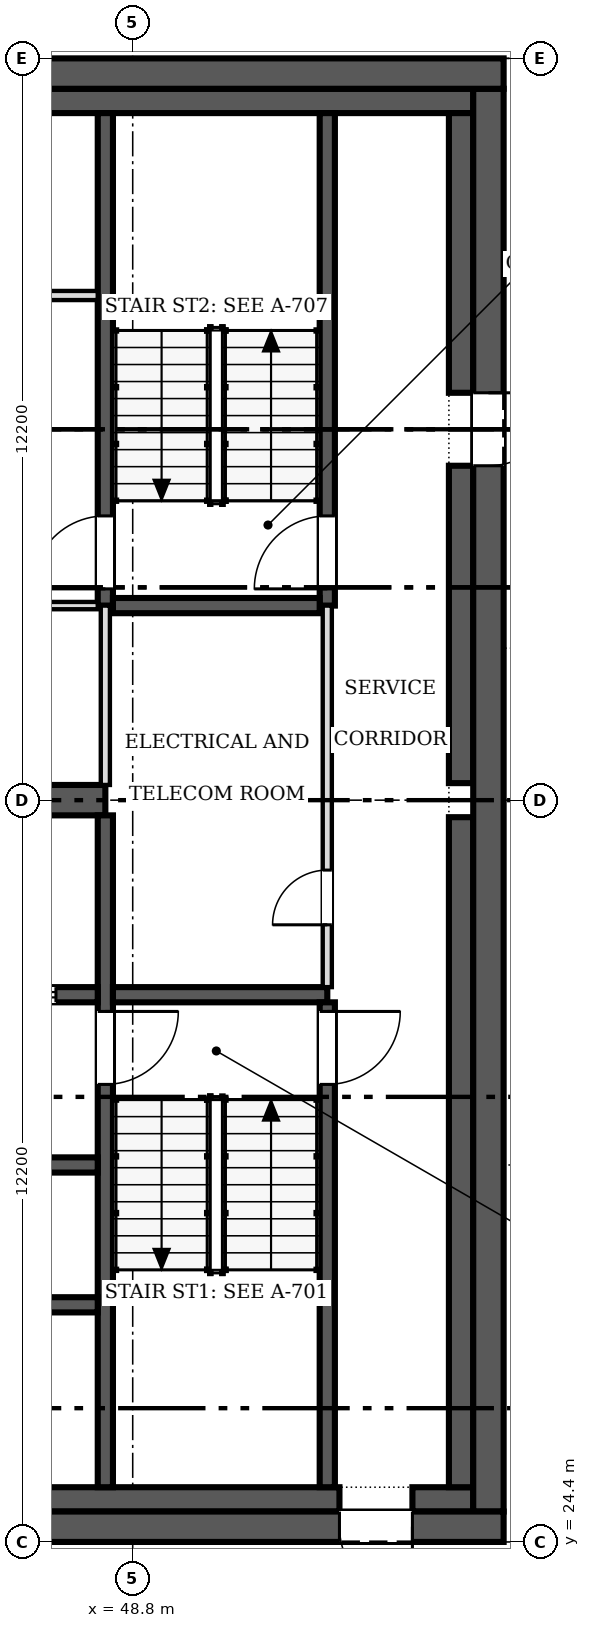
"""IFC4 building model, lengths in metres.
Left out: names, types, materials, properties, quantities, classifications, styles, units other than length and angle.
Written with IfcOpenShell. Run it as: python <this file> out.ifc"""

import sys

from ifc_helpers import new_model, si_unit, direction, frame, frame_2d, origin, place, context, subcontext, project, spatial, rectangle, extrude, source, transform, mapped, element, fill, save


model = new_model("IFC4")
c1 = context("Model", 3, precision=1e-05, world=origin(), true_north=direction((0.0, 1.0)))
c2 = subcontext(c1, "Body", "Model", "MODEL_VIEW")
j1 = project(units=[si_unit("LENGTHUNIT", "METRE"), si_unit("PLANEANGLEUNIT", "RADIAN")], contexts=[c1])
p1 = place(None, origin())
s1 = spatial("IfcSite", under=j1, at=p1, CompositionType="ELEMENT")
p2 = place(p1, origin())
s2 = spatial("IfcBuilding", under=s1, at=p2, CompositionType="ELEMENT")
p3 = place(p2, frame((0.0, 0.0, 197.9)))
s3 = spatial("IfcBuildingStorey", under=s2, at=p3, CompositionType="ELEMENT", Elevation=197.9)
p4 = place(p3, frame((54.9, 24.65, 0.0), z_axis=(0.0, 0.0, 1.0), x_axis=(-1.0, 0.0, 0.0)))
e1 = element("IfcWall", 1, at=p4, inside=s3, PredefinedType="SHEAR", context=c2, shape_type="SweptSolid", body=[
    extrude(rectangle(XDim=24.4, YDim=0.5, at=frame_2d((12.2, 0.0))), origin(), (0.0, 0.0, 1.0), 3.8),
])
m1 = source(origin(), c2, "Body", "SweptSolid", [
    extrude(rectangle(XDim=1.2, YDim=2.1, at=frame_2d((0.6, 1.05))), frame((0.0, 0.26, 0.0), z_axis=(0.0, -1.0, 0.0), x_axis=(1.0, 0.0, 0.0)), (0.0, 0.0, 1.0), 0.52),
])
p5 = place(p4, frame((1.5, 0.0, 0.0)))
e2 = element("IfcOpeningElement", 2, at=p5, cuts=e1, PredefinedType="OPENING", context=c2, shape_type="MappedRepresentation", body=[
    mapped(m1, transform((0.0, 0.0, 0.0), scale=1.0)),
])
p6 = place(p3, frame((30.5, 48.55, 0.0), z_axis=(0.0, 0.0, 1.0), x_axis=(1.0, 0.0, 0.0)))
e3 = element("IfcWall", 3, at=p6, inside=s3, PredefinedType="SHEAR", context=c2, shape_type="SweptSolid", body=[
    extrude(rectangle(XDim=24.4, YDim=0.5, at=frame_2d((12.2, 0.0))), origin(), (0.0, 0.0, 1.0), 3.8),
])
p7 = place(p3, frame((54.65, 48.3, 0.0), z_axis=(0.0, 0.0, 1.0), x_axis=(0.0, -1.0, 0.0)))
e4 = element("IfcWall", 4, at=p7, inside=s3, PredefinedType="SHEAR", context=c2, shape_type="SweptSolid", body=[
    extrude(rectangle(XDim=23.4, YDim=0.5, at=frame_2d((11.7, 0.0))), origin(), (0.0, 0.0, 1.0), 3.8),
])
p8 = place(p7, frame((5.0, 0.0, 0.0)))
e5 = element("IfcOpeningElement", 5, at=p8, cuts=e4, PredefinedType="OPENING", context=c2, shape_type="MappedRepresentation", body=[
    mapped(m1, transform((0.0, 0.0, 0.0), scale=1.0)),
])
p9 = place(p3, frame((31.0, 25.1, 0.0), z_axis=(0.0, 0.0, 1.0), x_axis=(1.0, 0.0, 0.0)))
e6 = element("IfcWall", 6, at=p9, inside=s3, PredefinedType="SOLIDWALL", context=c2, shape_type="SweptSolid", body=[
    extrude(rectangle(XDim=21.2, YDim=0.4, at=frame_2d((10.6, 0.0))), origin(), (0.0, 0.0, 1.0), 3.8),
])
p10 = place(p3, frame((53.4, 25.1, 0.0), z_axis=(0.0, 0.0, 1.0), x_axis=(1.0, 0.0, 0.0)))
e7 = element("IfcWall", 7, at=p10, inside=s3, PredefinedType="SOLIDWALL", context=c2, shape_type="SweptSolid", body=[
    extrude(rectangle(XDim=1.0, YDim=0.4, at=frame_2d((0.5, 0.0))), origin(), (0.0, 0.0, 1.0), 3.8),
])
p11 = place(p3, frame((31.0, 48.1, 0.0), z_axis=(0.0, 0.0, 1.0), x_axis=(1.0, 0.0, 0.0)))
e8 = element("IfcWall", 8, at=p11, inside=s3, PredefinedType="SOLIDWALL", context=c2, shape_type="SweptSolid", body=[
    extrude(rectangle(XDim=23.4, YDim=0.4, at=frame_2d((11.7, 0.0))), origin(), (0.0, 0.0, 1.0), 3.8),
])
p12 = place(p3, frame((54.2, 25.3, 0.0), z_axis=(0.0, 0.0, 1.0), x_axis=(0.0, 1.0, 0.0)))
e9 = element("IfcWall", 9, at=p12, inside=s3, PredefinedType="SOLIDWALL", context=c2, shape_type="SweptSolid", body=[
    extrude(rectangle(XDim=11.02, YDim=0.4, at=frame_2d((5.51, 0.0))), origin(), (0.0, 0.0, 1.0), 3.8),
])
p13 = place(p3, frame((54.2, 36.88, 0.0), z_axis=(0.0, 0.0, 1.0), x_axis=(0.0, 1.0, 0.0)))
e10 = element("IfcWall", 10, at=p13, inside=s3, PredefinedType="SOLIDWALL", context=c2, shape_type="SweptSolid", body=[
    extrude(rectangle(XDim=5.22, YDim=0.4, at=frame_2d((2.61, 0.0))), origin(), (0.0, 0.0, 1.0), 3.8),
])
p14 = place(p3, frame((54.2, 43.3, 0.0), z_axis=(0.0, 0.0, 1.0), x_axis=(0.0, 1.0, 0.0)))
e11 = element("IfcWall", 11, at=p14, inside=s3, PredefinedType="SOLIDWALL", context=c2, shape_type="SweptSolid", body=[
    extrude(rectangle(XDim=4.6, YDim=0.4, at=frame_2d((2.3, 0.0))), origin(), (0.0, 0.0, 1.0), 3.8),
])
p15 = place(p3, frame((31.4, 36.6, 0.0), z_axis=(0.0, 0.0, 1.0), x_axis=(1.0, 0.0, 0.0)))
e12 = element("IfcWall", 12, at=p15, inside=s3, PredefinedType="SHEAR", context=c2, shape_type="SweptSolid", body=[
    extrude(rectangle(XDim=16.95, YDim=0.5, at=frame_2d((8.475, 0.0))), origin(), (0.0, 0.0, 1.0), 3.8),
])
p16 = place(p3, frame((48.35, 36.35, 0.0), z_axis=(0.0, 0.0, 1.0), x_axis=(0.0, -1.0, 0.0)))
e13 = element("IfcWall", 13, at=p16, inside=s3, PredefinedType="SOLIDWALL", context=c2, shape_type="SweptSolid", body=[
    extrude(rectangle(XDim=11.05, YDim=0.25, at=frame_2d((5.525, 0.0))), origin(), (0.0, 0.0, 1.0), 3.8),
])
m2 = source(origin(), c2, "Body", "SweptSolid", [
    extrude(rectangle(XDim=1.2, YDim=2.1, at=frame_2d((0.6, 1.05))), frame((0.0, 0.135, 0.0), z_axis=(0.0, -1.0, 0.0), x_axis=(1.0, 0.0, 0.0)), (0.0, 0.0, 1.0), 0.27),
])
p17 = place(p16, frame((3.225, 0.0, 0.0)))
e14 = element("IfcOpeningElement", 14, at=p17, cuts=e13, PredefinedType="OPENING", context=c2, shape_type="MappedRepresentation", body=[
    mapped(m2, transform((0.0, 0.0, 0.0), scale=1.0)),
])
p18 = place(p3, frame((48.225, 33.4, 0.0), z_axis=(0.0, 0.0, 1.0), x_axis=(-1.0, 0.0, 0.0)))
e15 = element("IfcWall", 15, at=p18, inside=s3, PredefinedType="SOLIDWALL", context=c2, shape_type="SweptSolid", body=[
    extrude(rectangle(XDim=5.275, YDim=0.25, at=frame_2d((2.638, 0.0))), origin(), (0.0, 0.0, 1.0), 3.8),
])
p19 = place(p18, frame((3.512, 0.0, 0.0)))
e16 = element("IfcOpeningElement", 16, at=p19, cuts=e15, PredefinedType="OPENING", context=c2, shape_type="MappedRepresentation", body=[
    mapped(m2, transform((0.0, 0.0, 0.0), scale=1.0)),
])
p20 = place(p18, frame((0.688, 0.0, 0.0)))
e17 = element("IfcOpeningElement", 17, at=p20, cuts=e15, PredefinedType="OPENING", context=c2, shape_type="MappedRepresentation", body=[
    mapped(m2, transform((0.0, 0.0, 0.0), scale=1.0)),
])
p21 = place(p3, frame((48.475, 33.4, 0.0), z_axis=(0.0, 0.0, 1.0), x_axis=(1.0, 0.0, 0.0)))
e18 = element("IfcWall", 18, at=p21, inside=s3, PredefinedType="SOLIDWALL", context=c2, shape_type="SweptSolid", body=[
    extrude(rectangle(XDim=3.525, YDim=0.25, at=frame_2d((1.762, 0.0))), origin(), (0.0, 0.0, 1.0), 3.8),
])
p22 = place(p3, frame((48.35, 47.9, 0.0), z_axis=(0.0, 0.0, 1.0), x_axis=(0.0, -1.0, 0.0)))
e19 = element("IfcWall", 19, at=p22, inside=s3, PredefinedType="SOLIDWALL", context=c2, shape_type="SweptSolid", body=[
    extrude(rectangle(XDim=8.1, YDim=0.25, at=frame_2d((4.05, 0.0))), origin(), (0.0, 0.0, 1.0), 3.8),
])
p23 = place(p22, frame((6.625, 0.0, 0.0)))
e20 = element("IfcOpeningElement", 20, at=p23, cuts=e19, PredefinedType="OPENING", context=c2, shape_type="MappedRepresentation", body=[
    mapped(m2, transform((0.0, 0.0, 0.0), scale=1.0)),
])
p24 = place(p3, frame((52.0, 25.3, 0.0), z_axis=(0.0, 0.0, 1.0), x_axis=(0.0, 1.0, 0.0)))
e21 = element("IfcWall", 21, at=p24, inside=s3, PredefinedType="SOLIDWALL", context=c2, shape_type="SweptSolid", body=[
    extrude(rectangle(XDim=7.975, YDim=0.25, at=frame_2d((3.987, 0.0))), origin(), (0.0, 0.0, 1.0), 3.8),
])
p25 = place(p24, frame((6.625, 0.0, 0.0)))
e22 = element("IfcOpeningElement", 22, at=p25, cuts=e21, PredefinedType="OPENING", context=c2, shape_type="MappedRepresentation", body=[
    mapped(m2, transform((0.0, 0.0, 0.0), scale=1.0)),
])
p26 = place(p3, frame((52.0, 39.8, 0.0), z_axis=(0.0, 0.0, 1.0), x_axis=(0.0, 1.0, 0.0)))
e23 = element("IfcWall", 23, at=p26, inside=s3, PredefinedType="SOLIDWALL", context=c2, shape_type="SweptSolid", body=[
    extrude(rectangle(XDim=8.1, YDim=0.25, at=frame_2d((4.05, 0.0))), origin(), (0.0, 0.0, 1.0), 3.8),
])
p27 = place(p26, frame((0.275, 0.0, 0.0)))
e24 = element("IfcOpeningElement", 24, at=p27, cuts=e23, PredefinedType="OPENING", context=c2, shape_type="MappedRepresentation", body=[
    mapped(m2, transform((0.0, 0.0, 0.0), scale=1.0)),
])
for number, where, z_axis, x_axis in (
    (25, (42.95, 28.3, 0.0), (0.0, 0.0, 1.0), (1.0, 0.0, 0.0)),
    (26, (42.95, 30.6, 0.0), (0.0, 0.0, 1.0), (1.0, 0.0, 0.0)),
):
    element("IfcWall", number, at=place(p3, frame(where, z_axis=z_axis, x_axis=x_axis)), inside=s3, PredefinedType="SOLIDWALL", context=c2, shape_type="SweptSolid", body=[
        extrude(rectangle(XDim=5.275, YDim=0.25, at=frame_2d((2.638, 0.0))), origin(), (0.0, 0.0, 1.0), 3.8),
    ])
p28 = place(p3, frame((48.475, 39.8, 0.0), z_axis=(0.0, 0.0, 1.0), x_axis=(1.0, 0.0, 0.0)))
e27 = element("IfcWall", 27, at=p28, inside=s3, PredefinedType="SOLIDWALL", context=c2, shape_type="SweptSolid", body=[
    extrude(rectangle(XDim=3.4, YDim=0.25, at=frame_2d((1.7, 0.0))), origin(), (0.0, 0.0, 1.0), 3.8),
])
p29 = place(p3, frame((52.0, 33.525, 0.0), z_axis=(0.0, 0.0, 1.0), x_axis=(0.0, 1.0, 0.0)))
e28 = element("IfcWall", 28, at=p29, inside=s3, PredefinedType="PARTITIONING", context=c2, shape_type="SweptSolid", body=[
    extrude(rectangle(XDim=6.275, YDim=0.15, at=frame_2d((3.138, 0.0))), origin(), (0.0, 0.0, 1.0), 3.6),
])
m3 = source(origin(), c2, "Body", "SweptSolid", [
    extrude(rectangle(XDim=0.9, YDim=2.1, at=frame_2d((0.45, 1.05))), frame((0.0, 0.085, 0.0), z_axis=(0.0, -1.0, 0.0), x_axis=(1.0, 0.0, 0.0)), (0.0, 0.0, 1.0), 0.17),
])
p30 = place(p29, frame((1.025, 0.0, 0.0)))
e29 = element("IfcOpeningElement", 29, at=p30, cuts=e28, PredefinedType="OPENING", context=c2, shape_type="MappedRepresentation", body=[
    mapped(m3, transform((0.0, 0.0, 0.0), scale=1.0)),
])
p31 = place(p3, frame((48.225, 39.8, 0.0), z_axis=(0.0, 0.0, 1.0), x_axis=(-1.0, 0.0, 0.0)))
e30 = element("IfcWall", 30, at=p31, inside=s3, PredefinedType="PARTITIONING", context=c2, shape_type="SweptSolid", body=[
    extrude(rectangle(XDim=5.275, YDim=0.12, at=frame_2d((2.638, 0.0))), origin(), (0.0, 0.0, 1.0), 3.6),
])
m4 = source(origin(), c2, "Body", "SweptSolid", [
    extrude(rectangle(XDim=0.9, YDim=2.1, at=frame_2d((0.45, 1.05))), frame((0.0, 0.07, 0.0), z_axis=(0.0, -1.0, 0.0), x_axis=(1.0, 0.0, 0.0)), (0.0, 0.0, 1.0), 0.14),
])
p32 = place(p31, frame((2.25, 0.0, 0.0)))
e31 = element("IfcOpeningElement", 31, at=p32, cuts=e30, PredefinedType="OPENING", context=c2, shape_type="MappedRepresentation", body=[
    mapped(m4, transform((0.0, 0.0, 0.0), scale=1.0)),
])
p33 = place(p3, frame((42.95, 44.9, 0.0), z_axis=(0.0, 0.0, 1.0), x_axis=(1.0, 0.0, 0.0)))
e32 = element("IfcWall", 32, at=p33, inside=s3, PredefinedType="PARTITIONING", context=c2, shape_type="SweptSolid", body=[
    extrude(rectangle(XDim=5.275, YDim=0.15, at=frame_2d((2.638, 0.0))), origin(), (0.0, 0.0, 1.0), 3.6),
])
p34 = place(p33, frame((0.712, 0.0, 0.0)))
e33 = element("IfcOpeningElement", 33, at=p34, cuts=e32, PredefinedType="OPENING", context=c2, shape_type="MappedRepresentation", body=[
    mapped(m3, transform((0.0, 0.0, 0.0), scale=1.0)),
])
p35 = place(p33, frame((3.5, 0.0, 0.0)))
e34 = element("IfcOpeningElement", 34, at=p35, cuts=e32, PredefinedType="OPENING", context=c2, shape_type="MappedRepresentation", body=[
    mapped(m3, transform((0.0, 0.0, 0.0), scale=1.0)),
])
p36 = place(p3, frame((48.35, 36.85, 0.0), z_axis=(0.0, 0.0, 1.0), x_axis=(0.0, 1.0, 0.0)))
e35 = element("IfcWall", 35, at=p36, inside=s3, PredefinedType="PARTITIONING", context=c2, shape_type="SweptSolid", body=[
    extrude(rectangle(XDim=2.95, YDim=0.15, at=frame_2d((1.475, 0.0))), origin(), (0.0, 0.0, 1.0), 3.6),
])
m5 = source(origin(), c2, "Body", "SweptSolid", [
    extrude(rectangle(XDim=1.2, YDim=2.1, at=frame_2d((0.6, 1.05))), frame((0.0, 0.025, 0.0), z_axis=(0.0, -1.0, 0.0), x_axis=(1.0, 0.0, 0.0)), (0.0, 0.0, 1.0), 0.05),
])
p37 = place(p5, origin())
e36 = element("IfcDoor", 36, at=p37, inside=s3, OperationType="SINGLE_SWING_LEFT", PredefinedType="DOOR", context=c2, shape_type="MappedRepresentation", body=[
    mapped(m5, transform((0.0, 0.0, 0.0), scale=1.0)),
])
fill(e2, e36)
p38 = place(p8, origin())
e37 = element("IfcDoor", 37, at=p38, inside=s3, OperationType="SINGLE_SWING_LEFT", PredefinedType="DOOR", context=c2, shape_type="MappedRepresentation", body=[
    mapped(m5, transform((0.0, 0.0, 0.0), scale=1.0)),
])
fill(e5, e37)
p39 = place(p17, origin())
e38 = element("IfcDoor", 38, at=p39, inside=s3, OperationType="SINGLE_SWING_LEFT", PredefinedType="DOOR", context=c2, shape_type="MappedRepresentation", body=[
    mapped(m5, transform((0.0, 0.0, 0.0), scale=1.0)),
])
fill(e14, e38)
p40 = place(p20, origin())
e39 = element("IfcDoor", 39, at=p40, inside=s3, OperationType="DOUBLE_DOOR_SLIDING", PredefinedType="DOOR", context=c2, shape_type="MappedRepresentation", body=[
    mapped(m5, transform((0.0, 0.0, 0.0), scale=1.0)),
])
fill(e17, e39)
p41 = place(p23, origin())
e40 = element("IfcDoor", 40, at=p41, inside=s3, OperationType="SINGLE_SWING_RIGHT", PredefinedType="DOOR", context=c2, shape_type="MappedRepresentation", body=[
    mapped(m5, transform((0.0, 0.0, 0.0), scale=1.0)),
])
fill(e20, e40)
p42 = place(p25, origin())
e41 = element("IfcDoor", 41, at=p42, inside=s3, OperationType="SINGLE_SWING_RIGHT", PredefinedType="DOOR", context=c2, shape_type="MappedRepresentation", body=[
    mapped(m5, transform((0.0, 0.0, 0.0), scale=1.0)),
])
fill(e22, e41)
p43 = place(p27, origin())
e42 = element("IfcDoor", 42, at=p43, inside=s3, OperationType="SINGLE_SWING_LEFT", PredefinedType="DOOR", context=c2, shape_type="MappedRepresentation", body=[
    mapped(m5, transform((0.0, 0.0, 0.0), scale=1.0)),
])
fill(e24, e42)
m6 = source(origin(), c2, "Body", "SweptSolid", [
    extrude(rectangle(XDim=0.9, YDim=2.1, at=frame_2d((0.45, 1.05))), frame((0.0, 0.025, 0.0), z_axis=(0.0, -1.0, 0.0), x_axis=(1.0, 0.0, 0.0)), (0.0, 0.0, 1.0), 0.05),
])
p44 = place(p30, origin())
e43 = element("IfcDoor", 43, at=p44, inside=s3, OperationType="SINGLE_SWING_LEFT", PredefinedType="DOOR", context=c2, shape_type="MappedRepresentation", body=[
    mapped(m6, transform((0.0, 0.0, 0.0), scale=1.0)),
])
fill(e29, e43)
save(model, sys.argv[1])
